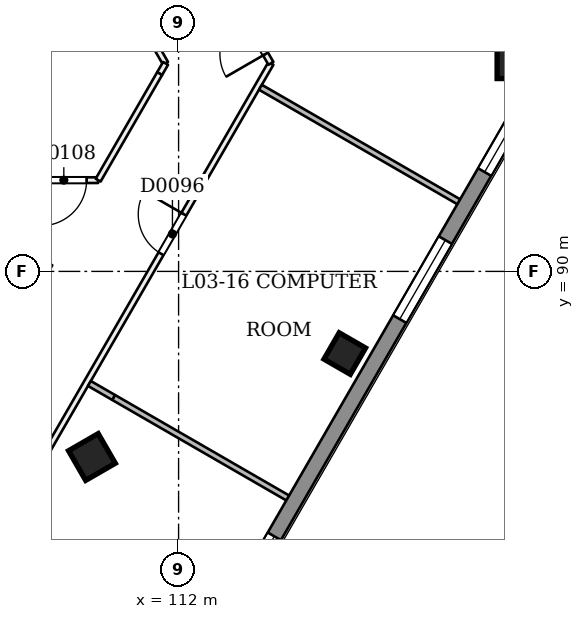
"""IFC4 building model, lengths in metres.
Left out: names, types, materials, properties, quantities, classifications, styles, units other than length and angle.
Written with IfcOpenShell. Run it as: python <this file> out.ifc"""

import sys

from ifc_helpers import new_model, si_unit, direction, frame, frame_2d, origin, origin_2d, place, context, subcontext, project, spatial, rectangle, extrude, element, fill, save


model = new_model("IFC4")
c1 = context("Model", 3, precision=1e-05, world=origin(), true_north=direction((0.0, 1.0)))
c2 = subcontext(c1, "Body", "Model", "MODEL_VIEW")
j1 = project(units=[si_unit("LENGTHUNIT", "METRE"), si_unit("PLANEANGLEUNIT", "RADIAN")], contexts=[c1])
p1 = place(None, origin())
s1 = spatial("IfcSite", under=j1, at=p1, CompositionType="ELEMENT")
p2 = place(p1, origin())
s2 = spatial("IfcBuilding", under=s1, at=p2, CompositionType="ELEMENT")
p3 = place(p2, frame((0.0, 0.0, 18.0)))
s3 = spatial("IfcBuildingStorey", under=s2, at=p3, CompositionType="ELEMENT", Elevation=18.0)
p4 = place(p3, frame((109.747, 85.069, -0.027), z_axis=(-0.02216777731, 0.038481960612, 0.999013377466), x_axis=(-0.501091830967, -0.865109194695, 0.022204913703)))
e1 = element("IfcColumn", 1, at=p4, inside=s3, PredefinedType="COLUMN", context=c2, shape_type="SweptSolid", body=[
    extrude(rectangle(XDim=0.9, YDim=0.9, at=origin_2d()), origin(), (0.0, 0.0, 1.0), 4.504),
])
for number, where, z_axis, x_axis in (
    (2, (116.372, 87.838, 0.0), (0.0, 0.0, 1.0), (0.5, 0.866, 0.0)),
    (3, (120.781, 95.474, 0.0), (0.0, 0.0, 1.0), (1.745e-08, 1.0, 0.0)),
):
    element("IfcColumn", number, at=place(p3, frame(where, z_axis=z_axis, x_axis=x_axis)), inside=s3, PredefinedType="COLUMN", context=c2, shape_type="SweptSolid", body=[
        extrude(rectangle(XDim=0.8, YDim=0.8, at=origin_2d()), origin(), (0.0, 0.0, 1.0), 4.5),
    ])
p5 = place(p3, frame((86.747, 47.526, 0.0), z_axis=(0.0, 0.0, 1.0), x_axis=(0.500000085768, 0.866025354266, 0.0)))
e4 = element("IfcWall", 4, at=p5, inside=s3, PredefinedType="PARTITIONING", context=c2, shape_type="SweptSolid", body=[
    extrude(rectangle(XDim=55.365, YDim=0.15, at=frame_2d((27.682, 0.0))), origin(), (0.0, 0.0, 1.0), 3.55),
])
p6 = place(p5, frame((0.97, 0.0, 0.0)))
e5 = element("IfcOpeningElement", 5, at=p6, cuts=e4, PredefinedType="OPENING", context=c2, shape_type="SweptSolid", body=[
    extrude(rectangle(XDim=1.2, YDim=2.1, at=frame_2d((0.6, 1.05))), frame((0.0, 0.085, 0.0), z_axis=(0.0, -1.0, 0.0), x_axis=(1.0, 0.0, 0.0)), (0.0, 0.0, 1.0), 0.171),
])
p7 = place(p5, frame((11.332, 0.0, 0.0)))
e6 = element("IfcOpeningElement", 6, at=p7, cuts=e4, PredefinedType="OPENING", context=c2, shape_type="SweptSolid", body=[
    extrude(rectangle(XDim=1.2, YDim=2.1, at=frame_2d((0.6, 1.05))), frame((0.0, 0.085, 0.0), z_axis=(0.0, -1.0, 0.0), x_axis=(1.0, 0.0, 0.0)), (0.0, 0.0, 1.0), 0.171),
])
p8 = place(p5, frame((22.582, 0.0, 0.0)))
e7 = element("IfcOpeningElement", 7, at=p8, cuts=e4, PredefinedType="OPENING", context=c2, shape_type="SweptSolid", body=[
    extrude(rectangle(XDim=1.2, YDim=2.1, at=frame_2d((0.6, 1.05))), frame((0.0, 0.085, 0.0), z_axis=(0.0, -1.0, 0.0), x_axis=(1.0, 0.0, 0.0)), (0.0, 0.0, 1.0), 0.171),
])
p9 = place(p5, frame((28.365, 0.0, 0.0)))
e8 = element("IfcOpeningElement", 8, at=p9, cuts=e4, PredefinedType="OPENING", context=c2, shape_type="SweptSolid", body=[
    extrude(rectangle(XDim=1.0, YDim=2.1, at=frame_2d((0.5, 1.05))), frame((0.0, 0.085, 0.0), z_axis=(0.0, -1.0, 0.0), x_axis=(1.0, 0.0, 0.0)), (0.0, 0.0, 1.0), 0.171),
])
p10 = place(p5, frame((30.615, 0.0, 0.0)))
e9 = element("IfcOpeningElement", 9, at=p10, cuts=e4, PredefinedType="OPENING", context=c2, shape_type="SweptSolid", body=[
    extrude(rectangle(XDim=1.0, YDim=2.1, at=frame_2d((0.5, 1.05))), frame((0.0, 0.085, 0.0), z_axis=(0.0, -1.0, 0.0), x_axis=(1.0, 0.0, 0.0)), (0.0, 0.0, 1.0), 0.171),
])
p11 = place(p5, frame((38.332, 0.0, 0.0)))
e10 = element("IfcOpeningElement", 10, at=p11, cuts=e4, PredefinedType="OPENING", context=c2, shape_type="SweptSolid", body=[
    extrude(rectangle(XDim=1.2, YDim=2.1, at=frame_2d((0.6, 1.05))), frame((0.0, 0.085, 0.0), z_axis=(0.0, -1.0, 0.0), x_axis=(1.0, 0.0, 0.0)), (0.0, 0.0, 1.0), 0.171),
])
p12 = place(p5, frame((49.582, 0.0, 0.0)))
e11 = element("IfcOpeningElement", 11, at=p12, cuts=e4, PredefinedType="OPENING", context=c2, shape_type="SweptSolid", body=[
    extrude(rectangle(XDim=1.2, YDim=2.1, at=frame_2d((0.6, 1.05))), frame((0.0, 0.085, 0.0), z_axis=(0.0, -1.0, 0.0), x_axis=(1.0, 0.0, 0.0)), (0.0, 0.0, 1.0), 0.171),
])
p13 = place(p3, frame((114.43, 95.474, 0.0), z_axis=(0.0, 0.0, 1.0), x_axis=(-0.500008701212, 0.866020380079, 0.0)))
e12 = element("IfcWall", 12, at=p13, inside=s3, PredefinedType="PARTITIONING", context=c2, shape_type="SweptSolid", body=[
    extrude(rectangle(XDim=3.495, YDim=0.15, at=frame_2d((1.747, 0.0))), origin(), (0.0, 0.0, 1.0), 3.55),
])
p14 = place(p13, frame((0.285, 0.0, 0.0)))
e13 = element("IfcOpeningElement", 13, at=p14, cuts=e12, PredefinedType="OPENING", context=c2, shape_type="SweptSolid", body=[
    extrude(rectangle(XDim=1.2, YDim=2.1, at=frame_2d((0.6, 1.05))), frame((0.0, 0.085, 0.0), z_axis=(0.0, -1.0, 0.0), x_axis=(1.0, 0.0, 0.0)), (0.0, 0.0, 1.0), 0.171),
])
p15 = place(p3, frame((109.883, 92.401, 0.0), z_axis=(0.0, 0.0, 1.0), x_axis=(-1.0, 0.0, 0.0)))
e14 = element("IfcWall", 14, at=p15, inside=s3, PredefinedType="PARTITIONING", context=c2, shape_type="SweptSolid", body=[
    extrude(rectangle(XDim=10.082, YDim=0.15, at=frame_2d((5.041, 0.0))), origin(), (0.0, 0.0, 1.0), 4.05),
])
p16 = place(p15, frame((5.987, 0.0, 0.0)))
e15 = element("IfcOpeningElement", 15, at=p16, cuts=e14, PredefinedType="OPENING", context=c2, shape_type="SweptSolid", body=[
    extrude(rectangle(XDim=1.2, YDim=2.1, at=frame_2d((0.6, 1.05))), frame((0.0, 0.085, 0.0), z_axis=(0.0, -1.0, 0.0), x_axis=(1.0, 0.0, 0.0)), (0.0, 0.0, 1.0), 0.171),
])
p17 = place(p15, frame((0.303, 0.0, 0.0)))
e16 = element("IfcOpeningElement", 16, at=p17, cuts=e14, PredefinedType="OPENING", context=c2, shape_type="SweptSolid", body=[
    extrude(rectangle(XDim=1.2, YDim=2.1, at=frame_2d((0.6, 1.05))), frame((0.0, 0.085, 0.0), z_axis=(0.0, -1.0, 0.0), x_axis=(1.0, 0.0, 0.0)), (0.0, 0.0, 1.0), 0.171),
])
p18 = place(p3, frame((109.91, 98.5, 0.0), z_axis=(0.0, 0.0, 1.0), x_axis=(0.499956301907, -0.86605063142, 0.0)))
e17 = element("IfcWall", 17, at=p18, inside=s3, PredefinedType="PARTITIONING", context=c2, shape_type="SweptSolid", body=[
    extrude(rectangle(XDim=3.494, YDim=0.15, at=frame_2d((1.747, 0.0))), origin(), (0.0, 0.0, 1.0), 3.55),
])
p19 = place(p3, frame((111.657, 95.474, 0.0), z_axis=(0.0, 0.0, 1.0), x_axis=(-0.500016430238, -0.866015917575, 0.0)))
e18 = element("IfcWall", 18, at=p19, inside=s3, PredefinedType="PARTITIONING", context=c2, shape_type="SweptSolid", body=[
    extrude(rectangle(XDim=0.312, YDim=0.15, at=frame_2d((0.156, 0.0))), origin(), (0.0, 0.0, 1.0), 3.55),
])
p20 = place(p3, frame((111.501, 95.204, 0.0), z_axis=(0.0, 0.0, 1.0), x_axis=(-0.499968406128, -0.866043643747, 0.0)))
e19 = element("IfcWall", 19, at=p20, inside=s3, PredefinedType="PARTITIONING", context=c2, shape_type="SweptSolid", body=[
    extrude(rectangle(XDim=3.237, YDim=0.15, at=frame_2d((1.618, 0.0))), origin(), (0.0, 0.0, 1.0), 4.05),
])
p21 = place(p3, frame((115.131, 83.888, 0.0), z_axis=(0.0, 0.0, 1.0), x_axis=(-0.866030670444, 0.499990877767, 0.0)))
e20 = element("IfcWall", 20, at=p21, inside=s3, PredefinedType="PARTITIONING", context=c2, shape_type="SweptSolid", body=[
    extrude(rectangle(XDim=5.59, YDim=0.15, at=frame_2d((2.795, 0.0))), origin(), (0.0, 0.0, 1.0), 4.05),
])
p22 = place(p3, frame((110.29, 86.683, 0.0), z_axis=(0.0, 0.0, 1.0), x_axis=(-0.865986508459, 0.50006736263, 0.0)))
e21 = element("IfcWall", 21, at=p22, inside=s3, PredefinedType="PARTITIONING", context=c2, shape_type="SweptSolid", body=[
    extrude(rectangle(XDim=0.735, YDim=0.15, at=frame_2d((0.368, 0.0))), origin(), (0.0, 0.0, 1.0), 3.55),
])
p23 = place(p3, frame((119.631, 91.683, 0.0), z_axis=(0.0, 0.0, 1.0), x_axis=(-0.866025537322, 0.499999768706, 0.0)))
e22 = element("IfcWall", 22, at=p23, inside=s3, PredefinedType="PARTITIONING", context=c2, shape_type="SweptSolid", body=[
    extrude(rectangle(XDim=6.325, YDim=0.15, at=frame_2d((3.163, 0.0))), origin(), (0.0, 0.0, 1.0), 4.05),
])
p24 = place(p3, frame((121.762, 95.574, 0.0), z_axis=(0.0, 0.0, 1.0), x_axis=(-0.499997306052, -0.866026959131, 0.0)))
e23 = element("IfcWall", 23, at=p24, inside=s3, PredefinedType="SOLIDWALL", context=c2, shape_type="SweptSolid", body=[
    extrude(rectangle(XDim=62.87, YDim=0.4, at=frame_2d((31.435, 0.0))), origin(), (0.0, 0.0, 1.0), 3.55),
])
p25 = place(p24, frame((59.452, 0.0, 0.9)))
e24 = element("IfcOpeningElement", 24, at=p25, cuts=e23, PredefinedType="OPENING", context=c2, shape_type="SweptSolid", body=[
    extrude(rectangle(XDim=2.4, YDim=1.5, at=frame_2d((1.2, 0.75))), frame((0.0, 0.21, 0.0), z_axis=(0.0, -1.0, 0.0), x_axis=(1.0, 0.0, 0.0)), (0.0, 0.0, 1.0), 0.421),
])
p26 = place(p24, frame((54.986, 0.0, 0.9)))
e25 = element("IfcOpeningElement", 25, at=p26, cuts=e23, PredefinedType="OPENING", context=c2, shape_type="SweptSolid", body=[
    extrude(rectangle(XDim=2.4, YDim=1.5, at=frame_2d((1.2, 0.75))), frame((0.0, 0.21, 0.0), z_axis=(0.0, -1.0, 0.0), x_axis=(1.0, 0.0, 0.0)), (0.0, 0.0, 1.0), 0.421),
])
p27 = place(p24, frame((50.486, 0.0, 0.9)))
e26 = element("IfcOpeningElement", 26, at=p27, cuts=e23, PredefinedType="OPENING", context=c2, shape_type="SweptSolid", body=[
    extrude(rectangle(XDim=2.4, YDim=1.5, at=frame_2d((1.2, 0.75))), frame((0.0, 0.21, 0.0), z_axis=(0.0, -1.0, 0.0), x_axis=(1.0, 0.0, 0.0)), (0.0, 0.0, 1.0), 0.421),
])
p28 = place(p24, frame((45.986, 0.0, 0.9)))
e27 = element("IfcOpeningElement", 27, at=p28, cuts=e23, PredefinedType="OPENING", context=c2, shape_type="SweptSolid", body=[
    extrude(rectangle(XDim=2.4, YDim=1.5, at=frame_2d((1.2, 0.75))), frame((0.0, 0.21, 0.0), z_axis=(0.0, -1.0, 0.0), x_axis=(1.0, 0.0, 0.0)), (0.0, 0.0, 1.0), 0.421),
])
p29 = place(p24, frame((41.486, 0.0, 0.9)))
e28 = element("IfcOpeningElement", 28, at=p29, cuts=e23, PredefinedType="OPENING", context=c2, shape_type="SweptSolid", body=[
    extrude(rectangle(XDim=2.4, YDim=1.5, at=frame_2d((1.2, 0.75))), frame((0.0, 0.21, 0.0), z_axis=(0.0, -1.0, 0.0), x_axis=(1.0, 0.0, 0.0)), (0.0, 0.0, 1.0), 0.421),
])
p30 = place(p24, frame((36.986, 0.0, 0.9)))
e29 = element("IfcOpeningElement", 29, at=p30, cuts=e23, PredefinedType="OPENING", context=c2, shape_type="SweptSolid", body=[
    extrude(rectangle(XDim=2.4, YDim=1.5, at=frame_2d((1.2, 0.75))), frame((0.0, 0.21, 0.0), z_axis=(0.0, -1.0, 0.0), x_axis=(1.0, 0.0, 0.0)), (0.0, 0.0, 1.0), 0.421),
])
p31 = place(p24, frame((23.486, 0.0, 0.9)))
e30 = element("IfcOpeningElement", 30, at=p31, cuts=e23, PredefinedType="OPENING", context=c2, shape_type="SweptSolid", body=[
    extrude(rectangle(XDim=2.4, YDim=1.5, at=frame_2d((1.2, 0.75))), frame((0.0, 0.21, 0.0), z_axis=(0.0, -1.0, 0.0), x_axis=(1.0, 0.0, 0.0)), (0.0, 0.0, 1.0), 0.421),
])
p32 = place(p24, frame((18.986, 0.0, 0.9)))
e31 = element("IfcOpeningElement", 31, at=p32, cuts=e23, PredefinedType="OPENING", context=c2, shape_type="SweptSolid", body=[
    extrude(rectangle(XDim=2.4, YDim=1.5, at=frame_2d((1.2, 0.75))), frame((0.0, 0.21, 0.0), z_axis=(0.0, -1.0, 0.0), x_axis=(1.0, 0.0, 0.0)), (0.0, 0.0, 1.0), 0.421),
])
p33 = place(p24, frame((14.486, 0.0, 0.9)))
e32 = element("IfcOpeningElement", 32, at=p33, cuts=e23, PredefinedType="OPENING", context=c2, shape_type="SweptSolid", body=[
    extrude(rectangle(XDim=2.4, YDim=1.5, at=frame_2d((1.2, 0.75))), frame((0.0, 0.21, 0.0), z_axis=(0.0, -1.0, 0.0), x_axis=(1.0, 0.0, 0.0)), (0.0, 0.0, 1.0), 0.421),
])
p34 = place(p24, frame((5.486, 0.0, 0.9)))
e33 = element("IfcOpeningElement", 33, at=p34, cuts=e23, PredefinedType="OPENING", context=c2, shape_type="SweptSolid", body=[
    extrude(rectangle(XDim=2.4, YDim=1.5, at=frame_2d((1.2, 0.75))), frame((0.0, 0.21, 0.0), z_axis=(0.0, -1.0, 0.0), x_axis=(1.0, 0.0, 0.0)), (0.0, 0.0, 1.0), 0.421),
])
p35 = place(p24, frame((1.018, 0.0, 0.9)))
e34 = element("IfcOpeningElement", 34, at=p35, cuts=e23, PredefinedType="OPENING", context=c2, shape_type="SweptSolid", body=[
    extrude(rectangle(XDim=2.4, YDim=1.5, at=frame_2d((1.2, 0.75))), frame((0.0, 0.21, 0.0), z_axis=(0.0, -1.0, 0.0), x_axis=(1.0, 0.0, 0.0)), (0.0, 0.0, 1.0), 0.421),
])
p36 = place(p3, frame((116.262, 104.9, 0.0), z_axis=(0.0, 0.0, 1.0), x_axis=(0.50000615651, -0.866021849293, 0.0)))
e35 = element("IfcWall", 35, at=p36, inside=s3, PredefinedType="SOLIDWALL", context=c2, shape_type="SweptSolid", body=[
    extrude(rectangle(XDim=11.0, YDim=0.4, at=frame_2d((5.5, 0.0))), origin(), (0.0, 0.0, 1.0), 3.55),
])
p37 = place(p36, frame((4.3, 0.0, 0.9)))
e36 = element("IfcOpeningElement", 36, at=p37, cuts=e35, PredefinedType="OPENING", context=c2, shape_type="SweptSolid", body=[
    extrude(rectangle(XDim=2.4, YDim=1.5, at=frame_2d((1.2, 0.75))), frame((0.0, 0.21, 0.0), z_axis=(0.0, -1.0, 0.0), x_axis=(1.0, 0.0, 0.0)), (0.0, 0.0, 1.0), 0.421),
])
p38 = place(p12, origin())
e37 = element("IfcDoor", 37, at=p38, inside=s3, OperationType="SINGLE_SWING_RIGHT", PredefinedType="NOTDEFINED", context=c2, shape_type="SweptSolid", body=[
    extrude(rectangle(XDim=1.2, YDim=2.1, at=frame_2d((0.6, 1.05))), frame((0.0, 0.025, 0.0), z_axis=(0.0, -1.0, 0.0), x_axis=(1.0, 0.0, 0.0)), (0.0, 0.0, 1.0), 0.05),
])
fill(e11, e37)
p39 = place(p14, origin())
e38 = element("IfcDoor", 38, at=p39, inside=s3, OperationType="SINGLE_SWING_LEFT", PredefinedType="NOTDEFINED", context=c2, shape_type="SweptSolid", body=[
    extrude(rectangle(XDim=1.2, YDim=2.1, at=frame_2d((0.6, 1.05))), frame((0.0, 0.025, 0.0), z_axis=(0.0, -1.0, 0.0), x_axis=(1.0, 0.0, 0.0)), (0.0, 0.0, 1.0), 0.05),
])
fill(e13, e38)
p40 = place(p17, origin())
e39 = element("IfcDoor", 39, at=p40, inside=s3, OperationType="SINGLE_SWING_RIGHT", PredefinedType="NOTDEFINED", context=c2, shape_type="SweptSolid", body=[
    extrude(rectangle(XDim=1.2, YDim=2.1, at=frame_2d((0.6, 1.05))), frame((0.0, 0.025, 0.0), z_axis=(0.0, -1.0, 0.0), x_axis=(1.0, 0.0, 0.0)), (0.0, 0.0, 1.0), 0.05),
])
fill(e16, e39)
p41 = place(p33, origin())
e40 = element("IfcWindow", 40, at=p41, inside=s3, PartitioningType="SINGLE_PANEL", PredefinedType="WINDOW", context=c2, shape_type="SweptSolid", body=[
    extrude(rectangle(XDim=2.4, YDim=1.5, at=frame_2d((1.2, 0.75))), frame((0.0, 0.03, 0.0), z_axis=(0.0, -1.0, 0.0), x_axis=(1.0, 0.0, 0.0)), (0.0, 0.0, 1.0), 0.06),
])
fill(e32, e40)
p42 = place(p34, origin())
e41 = element("IfcWindow", 41, at=p42, inside=s3, PartitioningType="SINGLE_PANEL", PredefinedType="WINDOW", context=c2, shape_type="SweptSolid", body=[
    extrude(rectangle(XDim=2.4, YDim=1.5, at=frame_2d((1.2, 0.75))), frame((0.0, 0.03, 0.0), z_axis=(0.0, -1.0, 0.0), x_axis=(1.0, 0.0, 0.0)), (0.0, 0.0, 1.0), 0.06),
])
fill(e33, e41)
p43 = place(p35, origin())
e42 = element("IfcWindow", 42, at=p43, inside=s3, PartitioningType="SINGLE_PANEL", PredefinedType="WINDOW", context=c2, shape_type="SweptSolid", body=[
    extrude(rectangle(XDim=2.4, YDim=1.5, at=frame_2d((1.2, 0.75))), frame((0.0, 0.03, 0.0), z_axis=(0.0, -1.0, 0.0), x_axis=(1.0, 0.0, 0.0)), (0.0, 0.0, 1.0), 0.06),
])
fill(e34, e42)
save(model, sys.argv[1])
